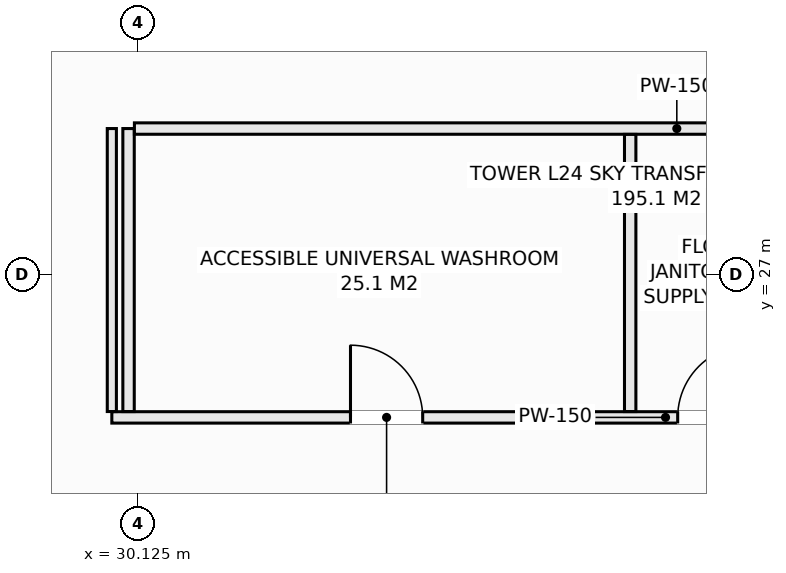
"""IFC4 building model, lengths in metres.
Left out: names, types, materials, properties, quantities, classifications, styles, units other than length and angle.
Written with IfcOpenShell. Run it as: python <this file> out.ifc"""

import sys

from ifc_helpers import new_model, si_unit, direction, frame, frame_2d, origin, place, context, subcontext, project, spatial, rectangle, extrude, element, fill, save


model = new_model("IFC4")
c1 = context("Model", 3, precision=1e-05, world=origin(), true_north=direction((0.0, 1.0)))
c2 = subcontext(c1, "Body", "Model", "MODEL_VIEW")
j1 = project(units=[si_unit("LENGTHUNIT", "METRE"), si_unit("PLANEANGLEUNIT", "RADIAN")], contexts=[c1])
p1 = place(None, origin())
s1 = spatial("IfcSite", under=j1, at=p1, CompositionType="ELEMENT")
p2 = place(p1, origin())
s2 = spatial("IfcBuilding", under=s1, at=p2, CompositionType="ELEMENT")
p3 = place(p2, frame((0.0, 0.0, 100.8)))
s3 = spatial("IfcBuildingStorey", under=s2, at=p3, CompositionType="ELEMENT", Elevation=100.8)
p4 = place(p3, frame((29.78, 25.12, 0.0), z_axis=(0.0, 0.0, 1.0), x_axis=(1.0, 0.0, 0.0)))
e1 = element("IfcWall", 1, at=p4, inside=s3, PredefinedType="PARTITIONING", context=c2, shape_type="SweptSolid", body=[
    extrude(rectangle(XDim=14.57, YDim=0.15, at=frame_2d((7.285, 0.0))), origin(), (0.0, 0.0, 1.0), 4.23),
])
p5 = place(p4, frame((3.14, 0.0, 0.0)))
e2 = element("IfcOpeningElement", 2, at=p5, cuts=e1, PredefinedType="OPENING", context=c2, shape_type="SweptSolid", body=[
    extrude(rectangle(XDim=0.95, YDim=2.1, at=frame_2d((0.475, 1.05))), frame((0.0, 0.085, 0.0), z_axis=(0.0, -1.0, 0.0), x_axis=(1.0, 0.0, 0.0)), (0.0, 0.0, 1.0), 0.17),
])
p6 = place(p4, frame((7.445, 0.0, 0.0)))
e3 = element("IfcOpeningElement", 3, at=p6, cuts=e1, PredefinedType="OPENING", context=c2, shape_type="SweptSolid", body=[
    extrude(rectangle(XDim=0.95, YDim=2.1, at=frame_2d((0.475, 1.05))), frame((0.0, 0.085, 0.0), z_axis=(0.0, -1.0, 0.0), x_axis=(1.0, 0.0, 0.0)), (0.0, 0.0, 1.0), 0.17),
])
p7 = place(p4, frame((11.115, 0.0, 0.0)))
e4 = element("IfcOpeningElement", 4, at=p7, cuts=e1, PredefinedType="OPENING", context=c2, shape_type="SweptSolid", body=[
    extrude(rectangle(XDim=0.95, YDim=2.1, at=frame_2d((0.475, 1.05))), frame((0.0, 0.085, 0.0), z_axis=(0.0, -1.0, 0.0), x_axis=(1.0, 0.0, 0.0)), (0.0, 0.0, 1.0), 0.17),
])
p8 = place(p3, frame((30.0, 25.197, 0.0), z_axis=(0.0, 0.0, 1.0), x_axis=(0.0, 1.0, 0.0)))
e5 = element("IfcWall", 5, at=p8, inside=s3, PredefinedType="PARTITIONING", context=c2, shape_type="SweptSolid", body=[
    extrude(rectangle(XDim=3.723, YDim=0.15, at=frame_2d((1.861, 0.0))), origin(), (0.0, 0.0, 1.0), 4.23),
])
p9 = place(p3, frame((30.077, 28.92, 0.0), z_axis=(0.0, 0.0, 1.0), x_axis=(1.0, 0.0, 0.0)))
e6 = element("IfcWall", 6, at=p9, inside=s3, PredefinedType="PARTITIONING", context=c2, shape_type="SweptSolid", body=[
    extrude(rectangle(XDim=14.273, YDim=0.15, at=frame_2d((7.137, 0.0))), origin(), (0.0, 0.0, 1.0), 4.23),
])
p10 = place(p3, frame((36.6, 25.197, 0.0), z_axis=(0.0, 0.0, 1.0), x_axis=(0.0, 1.0, 0.0)))
e7 = element("IfcWall", 7, at=p10, inside=s3, PredefinedType="PARTITIONING", context=c2, shape_type="SweptSolid", body=[
    extrude(rectangle(XDim=3.646, YDim=0.15, at=frame_2d((1.823, 0.0))), origin(), (0.0, 0.0, 1.0), 4.23),
])
p11 = place(p3, frame((29.78, 25.197, 0.0), z_axis=(0.0, 0.0, 1.0), x_axis=(0.0, 1.0, 0.0)))
e8 = element("IfcWall", 8, at=p11, inside=s3, PredefinedType="PARTITIONING", context=c2, shape_type="SweptSolid", body=[
    extrude(rectangle(XDim=3.723, YDim=0.12, at=frame_2d((1.861, 0.0))), origin(), (0.0, 0.0, 1.0), 4.23),
])
p12 = place(p5, origin())
e9 = element("IfcDoor", 9, at=p12, inside=s3, OperationType="SINGLE_SWING_LEFT", PredefinedType="DOOR", context=c2, shape_type="SweptSolid", body=[
    extrude(rectangle(XDim=0.95, YDim=2.1, at=frame_2d((0.475, 1.05))), frame((0.0, 0.025, 0.0), z_axis=(0.0, -1.0, 0.0), x_axis=(1.0, 0.0, 0.0)), (0.0, 0.0, 1.0), 0.05),
])
fill(e2, e9)
p13 = place(p6, origin())
e10 = element("IfcDoor", 10, at=p13, inside=s3, OperationType="SINGLE_SWING_RIGHT", PredefinedType="DOOR", context=c2, shape_type="SweptSolid", body=[
    extrude(rectangle(XDim=0.95, YDim=2.1, at=frame_2d((0.475, 1.05))), frame((0.0, 0.025, 0.0), z_axis=(0.0, -1.0, 0.0), x_axis=(1.0, 0.0, 0.0)), (0.0, 0.0, 1.0), 0.05),
])
fill(e3, e10)
save(model, sys.argv[1])
